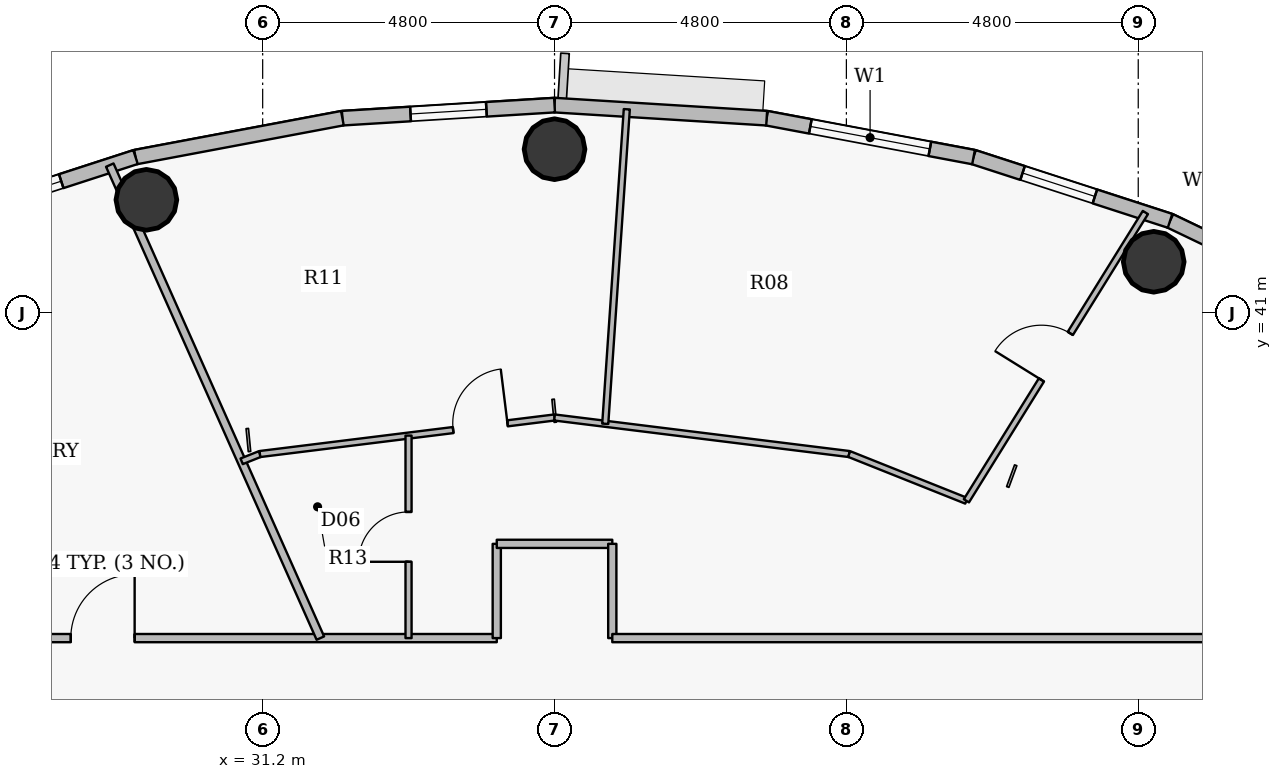
"""IFC4 building model, lengths in metres.
Left out: names, types, materials, properties, quantities, classifications, styles, units other than length and angle.
Written with IfcOpenShell. Run it as: python <this file> out.ifc"""

import sys

from ifc_helpers import new_model, si_unit, direction, frame, frame_2d, origin, origin_2d, place, context, subcontext, project, spatial, rectangle, hollow_circle, extrude, source, transform, mapped, element, fill, save


model = new_model("IFC4")
c1 = context("Model", 3, precision=1e-05, world=origin(), true_north=direction((0.0, 1.0)))
c2 = subcontext(c1, "Body", "Model", "MODEL_VIEW")
j1 = project(units=[si_unit("LENGTHUNIT", "METRE"), si_unit("PLANEANGLEUNIT", "RADIAN")], contexts=[c1])
p1 = place(None, origin())
s1 = spatial("IfcSite", under=j1, at=p1, CompositionType="ELEMENT")
p2 = place(p1, origin())
s2 = spatial("IfcBuilding", under=s1, at=p2, CompositionType="ELEMENT")
p3 = place(p2, frame((0.0, 0.0, 310.5)))
s3 = spatial("IfcBuildingStorey", under=s2, at=p3, CompositionType="ELEMENT", Elevation=310.5)
for number, where, z_axis, x_axis in (
    (1, (45.854, 41.839, 0.0), (0.0, 0.0, 1.0), (1.0, 0.0, 0.0)),
    (2, (36.0, 43.69, 0.0), (0.0, 0.0, 1.0), (1.0, 0.0, 0.0)),
    (3, (29.288, 42.858, 0.0), (0.0, 0.0, 1.0), (1.0, 0.0, 0.0)),
):
    element("IfcColumn", number, at=place(p3, frame(where, z_axis=z_axis, x_axis=x_axis)), inside=s3, PredefinedType="COLUMN", context=c2, shape_type="SweptSolid", body=[
        extrude(hollow_circle(Radius=0.5, WallThickness=0.032, at=origin_2d()), origin(), (0.0, 0.0, 1.0), 3.75),
    ])
p4 = place(p3, frame((46.123, 42.512, 0.0), z_axis=(0.0, 0.0, 1.0), x_axis=(0.901573741254, -0.43262546051, 0.0)))
e4 = element("IfcWall", 4, at=p4, inside=s3, PredefinedType="SOLIDWALL", context=c2, shape_type="SweptSolid", body=[
    extrude(rectangle(XDim=3.307, YDim=0.24, at=frame_2d((1.653, 0.0))), origin(), (0.0, 0.0, 1.0), 3.5),
])
p5 = place(p4, frame((0.853, 0.0, 0.9)))
e5 = element("IfcOpeningElement", 5, at=p5, cuts=e4, PredefinedType="OPENING", context=c2, shape_type="SweptSolid", body=[
    extrude(rectangle(XDim=1.6, YDim=1.75, at=origin_2d()), frame((0.8, 0.13, 0.875), z_axis=(0.0, -1.0, 0.0), x_axis=(1.0, 0.0, 0.0)), (0.0, 0.0, 1.0), 0.26),
])
p6 = place(p3, frame((42.891, 43.56, 0.0), z_axis=(0.0, 0.0, 1.0), x_axis=(0.95123136723, -0.308478339592, 0.0)))
e6 = element("IfcWall", 6, at=p6, inside=s3, PredefinedType="SOLIDWALL", context=c2, shape_type="SweptSolid", body=[
    extrude(rectangle(XDim=3.398, YDim=0.24, at=frame_2d((1.699, 0.0))), origin(), (0.0, 0.0, 1.0), 3.5),
])
p7 = place(p6, frame((0.848, 0.0, 0.9)))
e7 = element("IfcOpeningElement", 7, at=p7, cuts=e6, PredefinedType="OPENING", context=c2, shape_type="SweptSolid", body=[
    extrude(rectangle(XDim=1.25, YDim=1.65, at=origin_2d()), frame((0.625, 0.13, 0.825), z_axis=(0.0, -1.0, 0.0), x_axis=(1.0, 0.0, 0.0)), (0.0, 0.0, 1.0), 0.26),
])
p8 = place(p3, frame((39.489, 44.2, 0.0), z_axis=(0.0, 0.0, 1.0), x_axis=(0.982782655757, -0.184765395959, 0.0)))
e8 = element("IfcWall", 8, at=p8, inside=s3, PredefinedType="SOLIDWALL", context=c2, shape_type="SweptSolid", body=[
    extrude(rectangle(XDim=3.462, YDim=0.24, at=frame_2d((1.731, 0.0))), origin(), (0.0, 0.0, 1.0), 3.5),
])
p9 = place(p8, frame((0.731, 0.0, 0.9)))
e9 = element("IfcOpeningElement", 9, at=p9, cuts=e8, PredefinedType="OPENING", context=c2, shape_type="SweptSolid", body=[
    extrude(rectangle(XDim=2.0, YDim=1.75, at=origin_2d()), frame((1.0, 0.13, 0.875), z_axis=(0.0, -1.0, 0.0), x_axis=(1.0, 0.0, 0.0)), (0.0, 0.0, 1.0), 0.26),
])
p10 = place(p3, frame((36.0, 44.415, 0.0), z_axis=(0.0, 0.0, 1.0), x_axis=(0.998104946479, -0.061534671648, 0.0)))
e10 = element("IfcWall", 10, at=p10, inside=s3, PredefinedType="SOLIDWALL", context=c2, shape_type="SweptSolid", body=[
    extrude(rectangle(XDim=3.495, YDim=0.24, at=frame_2d((1.748, 0.0))), origin(), (0.0, 0.0, 1.0), 3.5),
])
p11 = place(p3, frame((32.511, 44.2, 0.0), z_axis=(0.0, 0.0, 1.0), x_axis=(0.998104946479, 0.061534671648, 0.0)))
e11 = element("IfcWall", 11, at=p11, inside=s3, PredefinedType="SOLIDWALL", context=c2, shape_type="SweptSolid", body=[
    extrude(rectangle(XDim=3.495, YDim=0.24, at=frame_2d((1.748, 0.0))), origin(), (0.0, 0.0, 1.0), 3.5),
])
p12 = place(p11, frame((1.123, 0.0, 0.9)))
e12 = element("IfcOpeningElement", 12, at=p12, cuts=e11, PredefinedType="OPENING", context=c2, shape_type="SweptSolid", body=[
    extrude(rectangle(XDim=1.25, YDim=1.65, at=origin_2d()), frame((0.625, 0.13, 0.825), z_axis=(0.0, -1.0, 0.0), x_axis=(1.0, 0.0, 0.0)), (0.0, 0.0, 1.0), 0.26),
])
p13 = place(p3, frame((29.109, 43.56, 0.0), z_axis=(0.0, 0.0, 1.0), x_axis=(0.982782655757, 0.184765395959, 0.0)))
e13 = element("IfcWall", 13, at=p13, inside=s3, PredefinedType="SOLIDWALL", context=c2, shape_type="SweptSolid", body=[
    extrude(rectangle(XDim=3.462, YDim=0.24, at=frame_2d((1.731, 0.0))), origin(), (0.0, 0.0, 1.0), 3.5),
])
p14 = place(p3, frame((25.877, 42.512, 0.0), z_axis=(0.0, 0.0, 1.0), x_axis=(0.95123136723, 0.308478339592, 0.0)))
e14 = element("IfcWall", 14, at=p14, inside=s3, PredefinedType="SOLIDWALL", context=c2, shape_type="SweptSolid", body=[
    extrude(rectangle(XDim=3.398, YDim=0.24, at=frame_2d((1.699, 0.0))), origin(), (0.0, 0.0, 1.0), 3.5),
])
p15 = place(p14, frame((0.863, 0.0, 0.9)))
e15 = element("IfcOpeningElement", 15, at=p15, cuts=e14, PredefinedType="OPENING", context=c2, shape_type="SweptSolid", body=[
    extrude(rectangle(XDim=1.25, YDim=1.65, at=origin_2d()), frame((0.625, 0.13, 0.825), z_axis=(0.0, -1.0, 0.0), x_axis=(1.0, 0.0, 0.0)), (0.0, 0.0, 1.0), 0.26),
])
p16 = place(p3, frame((24.95, 35.65, 0.0), z_axis=(0.0, 0.0, 1.0), x_axis=(1.0, 0.0, 0.0)))
e16 = element("IfcWall", 16, at=p16, inside=s3, PredefinedType="PARTITIONING", context=c2, shape_type="SweptSolid", body=[
    extrude(rectangle(XDim=10.1, YDim=0.135, at=frame_2d((5.05, 0.0))), origin(), (0.0, 0.0, 1.0), 3.035),
])
p17 = place(p16, frame((3.094, 0.0, 0.0)))
e17 = element("IfcOpeningElement", 17, at=p17, cuts=e16, PredefinedType="OPENING", context=c2, shape_type="SweptSolid", body=[
    extrude(rectangle(XDim=1.05, YDim=2.15, at=origin_2d()), frame((0.525, 0.078, 1.075), z_axis=(0.0, -1.0, 0.0), x_axis=(1.0, 0.0, 0.0)), (0.0, 0.0, 1.0), 0.155),
])
p18 = place(p3, frame((28.686, 43.428, 0.0), z_axis=(0.0, 0.0, 1.0), x_axis=(0.406736980157, -0.913545307564, 0.0)))
e18 = element("IfcWall", 18, at=p18, inside=s3, PredefinedType="PARTITIONING", context=c2, shape_type="SweptSolid", body=[
    extrude(rectangle(XDim=8.514, YDim=0.135, at=frame_2d((4.257, 0.0))), origin(), (0.0, 0.0, 1.0), 3.035),
])
p19 = place(p3, frame((30.854, 38.557, 0.0), z_axis=(0.0, 0.0, 1.0), x_axis=(0.928996661722, 0.370088101011, 0.0)))
e19 = element("IfcWall", 19, at=p19, inside=s3, PredefinedType="PARTITIONING", context=c2, shape_type="SweptSolid", body=[
    extrude(rectangle(XDim=0.323, YDim=0.1, at=frame_2d((0.162, 0.0))), origin(), (0.0, 0.0, 1.0), 3.035),
])
p20 = place(p3, frame((31.155, 38.677, 0.0), z_axis=(0.0, 0.0, 1.0), x_axis=(0.99239360053, 0.123105408601, 0.0)))
e20 = element("IfcWall", 20, at=p20, inside=s3, PredefinedType="PARTITIONING", context=c2, shape_type="SweptSolid", body=[
    extrude(rectangle(XDim=4.883, YDim=0.1, at=frame_2d((2.441, 0.0))), origin(), (0.0, 0.0, 1.0), 3.035),
])
p21 = place(p20, frame((3.203, 0.0, 0.0)))
e21 = element("IfcOpeningElement", 21, at=p21, cuts=e20, PredefinedType="OPENING", context=c2, shape_type="SweptSolid", body=[
    extrude(rectangle(XDim=0.9, YDim=2.1, at=origin_2d()), frame((0.45, 0.06, 1.05), z_axis=(0.0, -1.0, 0.0), x_axis=(1.0, 0.0, 0.0)), (0.0, 0.0, 1.0), 0.12),
])
p22 = place(p3, frame((33.599, 35.65, 0.0), z_axis=(0.0, 0.0, 1.0), x_axis=(0.0, 1.0, 0.0)))
e22 = element("IfcWall", 22, at=p22, inside=s3, PredefinedType="PARTITIONING", context=c2, shape_type="SweptSolid", body=[
    extrude(rectangle(XDim=3.33, YDim=0.1, at=frame_2d((1.665, 0.0))), origin(), (0.0, 0.0, 1.0), 3.5),
])
p23 = place(p22, frame((1.255, 0.0, 0.0)))
e23 = element("IfcOpeningElement", 23, at=p23, cuts=e22, PredefinedType="OPENING", context=c2, shape_type="SweptSolid", body=[
    extrude(rectangle(XDim=0.82, YDim=2.1, at=origin_2d()), frame((0.41, 0.06, 1.05), z_axis=(0.0, -1.0, 0.0), x_axis=(1.0, 0.0, 0.0)), (0.0, 0.0, 1.0), 0.12),
])
p24 = place(p3, frame((35.05, 35.65, 0.0), z_axis=(0.0, 0.0, 1.0), x_axis=(0.0, 1.0, 0.0)))
e24 = element("IfcWall", 24, at=p24, inside=s3, PredefinedType="PARTITIONING", context=c2, shape_type="SweptSolid", body=[
    extrude(rectangle(XDim=1.55, YDim=0.135, at=frame_2d((0.775, 0.0))), origin(), (0.0, 0.0, 1.0), 3.5),
])
p25 = place(p3, frame((35.05, 37.2, 0.0), z_axis=(0.0, 0.0, 1.0), x_axis=(1.0, 0.0, 0.0)))
e25 = element("IfcWall", 25, at=p25, inside=s3, PredefinedType="PARTITIONING", context=c2, shape_type="SweptSolid", body=[
    extrude(rectangle(XDim=1.9, YDim=0.135, at=frame_2d((0.95, 0.0))), origin(), (0.0, 0.0, 1.0), 3.035),
])
p26 = place(p3, frame((36.0, 39.278, 0.0), z_axis=(0.0, 0.0, 1.0), x_axis=(0.992394358254, -0.123099300182, 0.0)))
e26 = element("IfcWall", 26, at=p26, inside=s3, PredefinedType="PARTITIONING", context=c2, shape_type="SweptSolid", body=[
    extrude(rectangle(XDim=4.883, YDim=0.1, at=frame_2d((2.441, 0.0))), origin(), (0.0, 0.0, 1.0), 3.035),
])
p27 = place(p3, frame((36.834, 39.175, 0.0), z_axis=(0.0, 0.0, 1.0), x_axis=(0.068331768218, 0.997662653131, 0.0)))
e27 = element("IfcWall", 27, at=p27, inside=s3, PredefinedType="PARTITIONING", context=c2, shape_type="SweptSolid", body=[
    extrude(rectangle(XDim=5.184, YDim=0.1, at=frame_2d((2.592, 0.0))), origin(), (0.0, 0.0, 1.0), 2.985),
])
p28 = place(p3, frame((36.95, 35.65, 0.0), z_axis=(0.0, 0.0, 1.0), x_axis=(0.0, 1.0, 0.0)))
e28 = element("IfcWall", 28, at=p28, inside=s3, PredefinedType="PARTITIONING", context=c2, shape_type="SweptSolid", body=[
    extrude(rectangle(XDim=1.55, YDim=0.135, at=frame_2d((0.775, 0.0))), origin(), (0.0, 0.0, 1.0), 3.5),
])
p29 = place(p3, frame((36.95, 35.65, 0.0), z_axis=(0.0, 0.0, 1.0), x_axis=(1.0, 0.0, 0.0)))
e29 = element("IfcWall", 29, at=p29, inside=s3, PredefinedType="PARTITIONING", context=c2, shape_type="SweptSolid", body=[
    extrude(rectangle(XDim=10.1, YDim=0.135, at=frame_2d((5.05, 0.0))), origin(), (0.0, 0.0, 1.0), 3.035),
])
p30 = place(p3, frame((40.845, 38.677, 0.0), z_axis=(0.0, 0.0, 1.0), x_axis=(0.928792693453, -0.370599693184, 0.0)))
e30 = element("IfcWall", 30, at=p30, inside=s3, PredefinedType="PARTITIONING", context=c2, shape_type="SweptSolid", body=[
    extrude(rectangle(XDim=2.076, YDim=0.1, at=frame_2d((1.038, 0.0))), origin(), (0.0, 0.0, 1.0), 3.5),
])
p31 = place(p3, frame((42.773, 37.908, 0.0), z_axis=(0.0, 0.0, 1.0), x_axis=(0.527527282505, 0.849538089913, 0.0)))
e31 = element("IfcWall", 31, at=p31, inside=s3, PredefinedType="PARTITIONING", context=c2, shape_type="SweptSolid", body=[
    extrude(rectangle(XDim=5.581, YDim=0.1, at=frame_2d((2.791, 0.0))), origin(), (0.0, 0.0, 1.0), 2.985),
])
p32 = place(p31, frame((2.34, 0.0, 0.0)))
e32 = element("IfcOpeningElement", 32, at=p32, cuts=e31, PredefinedType="OPENING", context=c2, shape_type="SweptSolid", body=[
    extrude(rectangle(XDim=0.9, YDim=2.1, at=origin_2d()), frame((0.45, 0.06, 1.05), z_axis=(0.0, -1.0, 0.0), x_axis=(1.0, 0.0, 0.0)), (0.0, 0.0, 1.0), 0.12),
])
m1 = source(origin(), c2, "Body", "SweptSolid", [
    extrude(rectangle(XDim=1.25, YDim=1.65, at=origin_2d()), frame((0.625, 0.03, 0.825), z_axis=(0.0, -1.0, 0.0), x_axis=(1.0, 0.0, 0.0)), (0.0, 0.0, 1.0), 0.06),
])
p33 = place(p7, origin())
e33 = element("IfcWindow", 33, at=p33, inside=s3, PartitioningType="SINGLE_PANEL", PredefinedType="WINDOW", context=c2, shape_type="MappedRepresentation", body=[
    mapped(m1, transform((0.0, 0.0, 0.0), x_axis=(1.0, 0.0, 0.0), y_axis=(0.0, 1.0, 0.0), z_axis=(0.0, 0.0, 1.0), scale=1.0)),
])
fill(e7, e33)
m2 = source(origin(), c2, "Body", "SweptSolid", [
    extrude(rectangle(XDim=2.0, YDim=1.75, at=origin_2d()), frame((1.0, 0.03, 0.875), z_axis=(0.0, -1.0, 0.0), x_axis=(1.0, 0.0, 0.0)), (0.0, 0.0, 1.0), 0.06),
])
p34 = place(p9, origin())
e34 = element("IfcWindow", 34, at=p34, inside=s3, PartitioningType="DOUBLE_PANEL_VERTICAL", PredefinedType="WINDOW", context=c2, shape_type="MappedRepresentation", body=[
    mapped(m2, transform((0.0, 0.0, 0.0), x_axis=(1.0, 0.0, 0.0), y_axis=(0.0, 1.0, 0.0), z_axis=(0.0, 0.0, 1.0), scale=1.0)),
])
fill(e9, e34)
p35 = place(p15, origin())
e35 = element("IfcWindow", 35, at=p35, inside=s3, PartitioningType="SINGLE_PANEL", PredefinedType="WINDOW", context=c2, shape_type="MappedRepresentation", body=[
    mapped(m1, transform((0.0, 0.0, 0.0), x_axis=(1.0, 0.0, 0.0), y_axis=(0.0, 1.0, 0.0), z_axis=(0.0, 0.0, 1.0), scale=1.0)),
])
fill(e15, e35)
p36 = place(p12, origin())
e36 = element("IfcWindow", 36, at=p36, inside=s3, PartitioningType="SINGLE_PANEL", PredefinedType="WINDOW", context=c2, shape_type="MappedRepresentation", body=[
    mapped(m1, transform((0.0, 0.0, 0.0), x_axis=(1.0, 0.0, 0.0), y_axis=(0.0, 1.0, 0.0), z_axis=(0.0, 0.0, 1.0), scale=1.0)),
])
fill(e12, e36)
m3 = source(origin(), c2, "Body", "SweptSolid", [
    extrude(rectangle(XDim=0.9, YDim=2.1, at=origin_2d()), frame((0.45, 0.025, 1.05), z_axis=(0.0, -1.0, 0.0), x_axis=(1.0, 0.0, 0.0)), (0.0, 0.0, 1.0), 0.05),
])
p37 = place(p32, origin())
e37 = element("IfcDoor", 37, at=p37, inside=s3, OperationType="SINGLE_SWING_LEFT", PredefinedType="DOOR", context=c2, shape_type="MappedRepresentation", body=[
    mapped(m3, transform((0.0, 0.0, 0.0), x_axis=(1.0, 0.0, 0.0), y_axis=(0.0, 1.0, 0.0), z_axis=(0.0, 0.0, 1.0), scale=1.0)),
])
fill(e32, e37)
p38 = place(p21, origin())
e38 = element("IfcDoor", 38, at=p38, inside=s3, OperationType="SINGLE_SWING_RIGHT", PredefinedType="DOOR", context=c2, shape_type="MappedRepresentation", body=[
    mapped(m3, transform((0.0, 0.0, 0.0), x_axis=(1.0, 0.0, 0.0), y_axis=(0.0, 1.0, 0.0), z_axis=(0.0, 0.0, 1.0), scale=1.0)),
])
fill(e21, e38)
m4 = source(origin(), c2, "Body", "SweptSolid", [
    extrude(rectangle(XDim=0.82, YDim=2.1, at=origin_2d()), frame((0.41, 0.025, 1.05), z_axis=(0.0, -1.0, 0.0), x_axis=(1.0, 0.0, 0.0)), (0.0, 0.0, 1.0), 0.05),
])
p39 = place(p23, origin())
e39 = element("IfcDoor", 39, at=p39, inside=s3, OperationType="SINGLE_SWING_LEFT", PredefinedType="DOOR", context=c2, shape_type="MappedRepresentation", body=[
    mapped(m4, transform((0.0, 0.0, 0.0), x_axis=(1.0, 0.0, 0.0), y_axis=(0.0, 1.0, 0.0), z_axis=(0.0, 0.0, 1.0), scale=1.0)),
])
fill(e23, e39)
m5 = source(origin(), c2, "Body", "SweptSolid", [
    extrude(rectangle(XDim=1.05, YDim=2.15, at=origin_2d()), frame((0.525, 0.025, 1.075), z_axis=(0.0, -1.0, 0.0), x_axis=(1.0, 0.0, 0.0)), (0.0, 0.0, 1.0), 0.05),
])
p40 = place(p17, origin())
e40 = element("IfcDoor", 40, at=p40, inside=s3, OperationType="SINGLE_SWING_RIGHT", PredefinedType="DOOR", context=c2, shape_type="MappedRepresentation", body=[
    mapped(m5, transform((0.0, 0.0, 0.0), x_axis=(1.0, 0.0, 0.0), y_axis=(0.0, 1.0, 0.0), z_axis=(0.0, 0.0, 1.0), scale=1.0)),
])
fill(e17, e40)
save(model, sys.argv[1])
